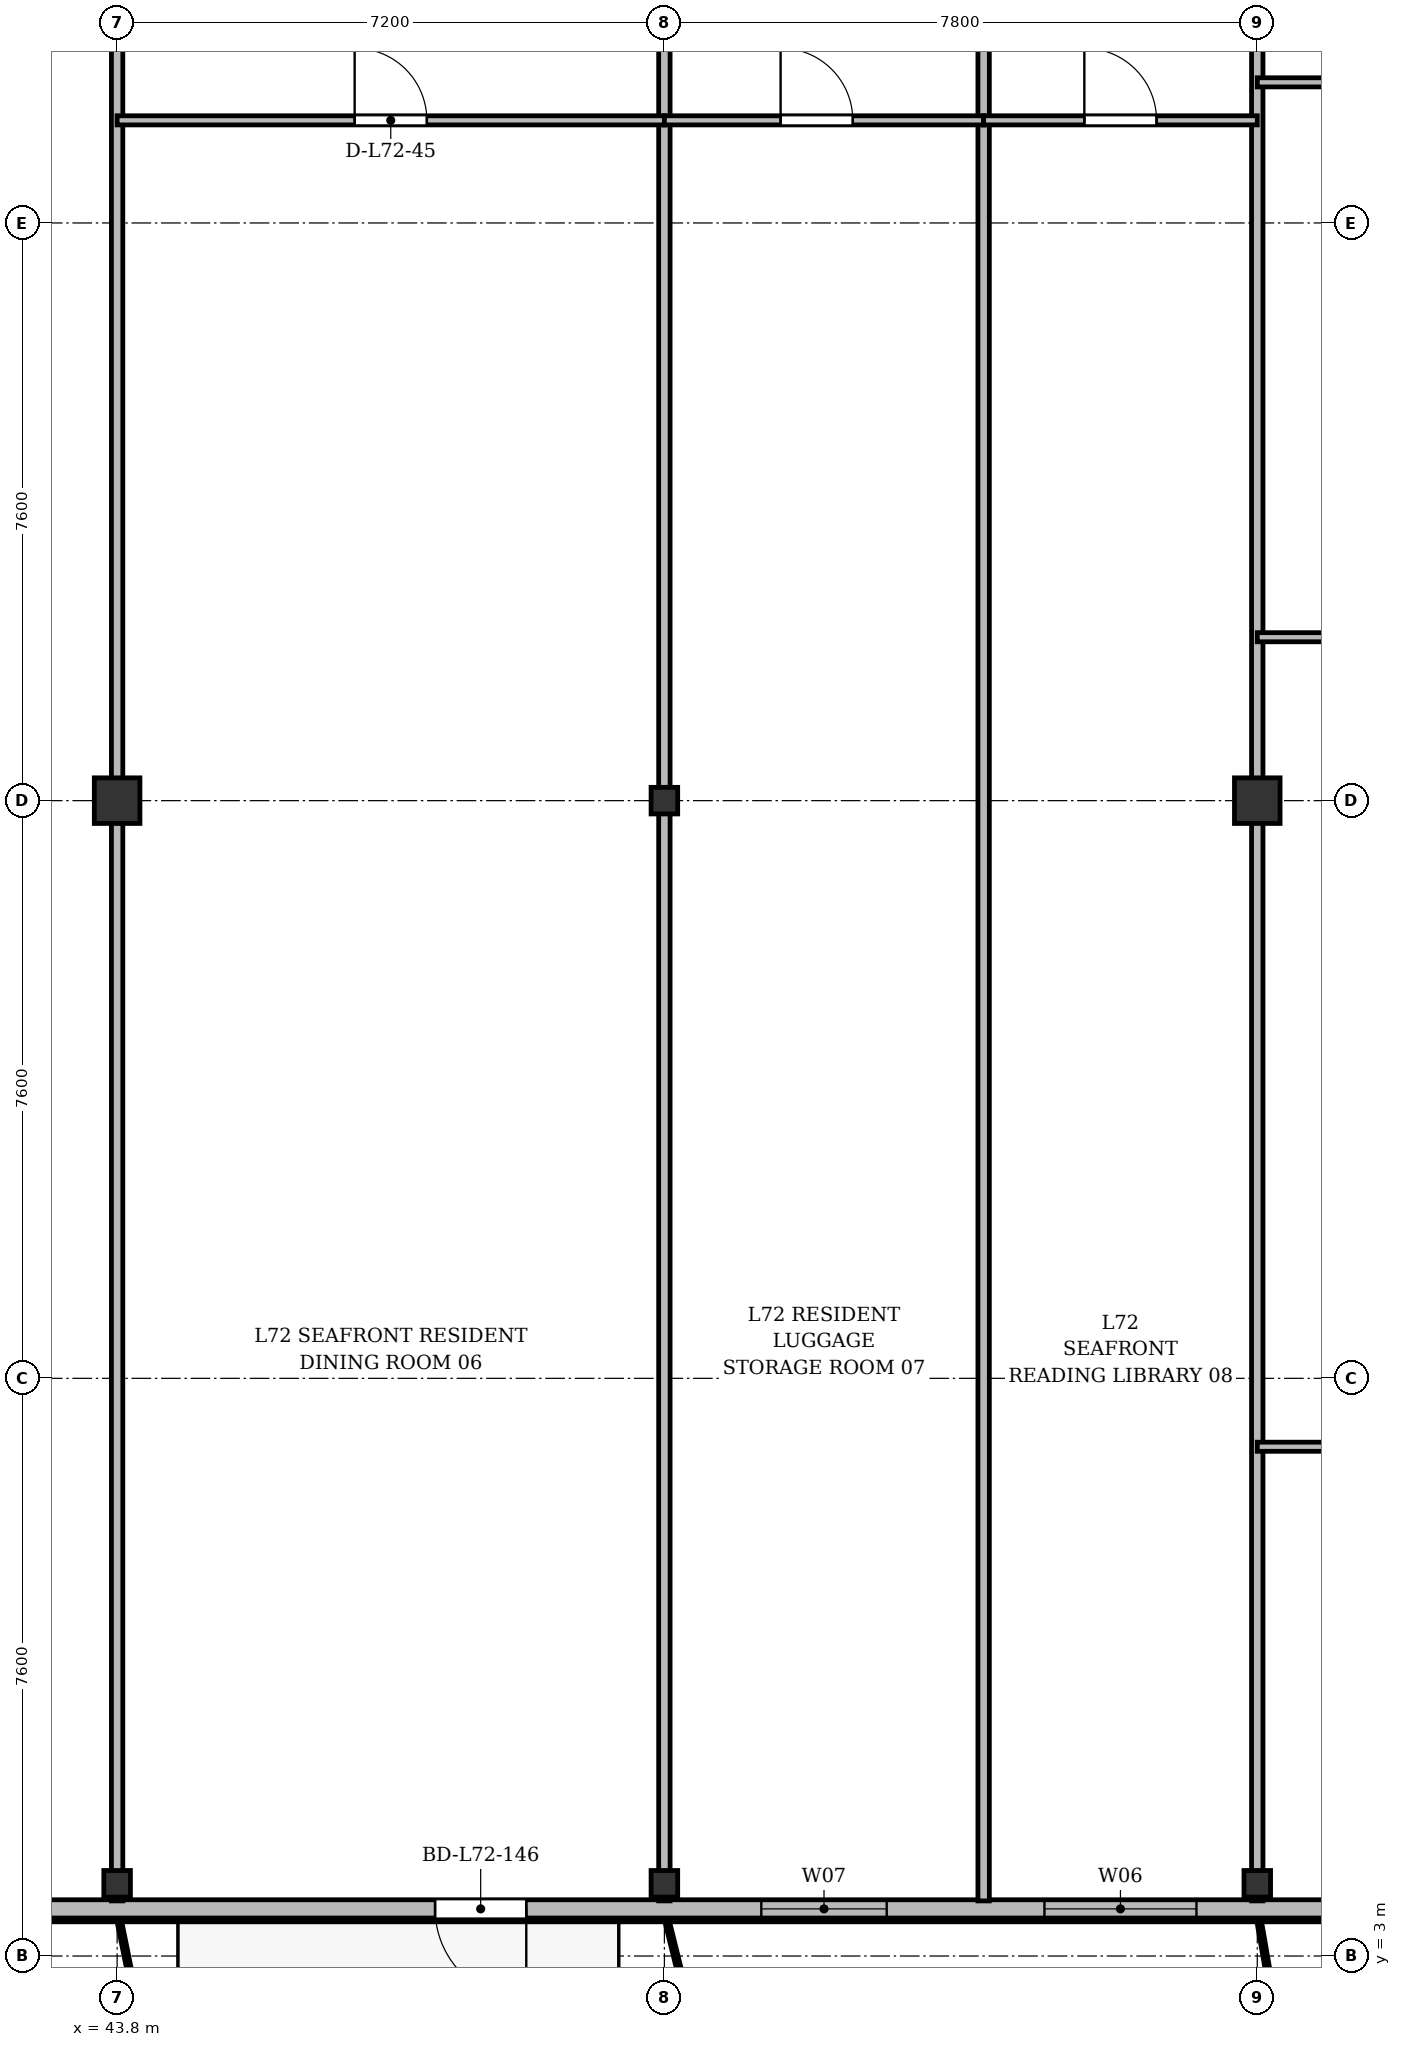
"""IFC4 building model, lengths in metres.
Left out: names, types, materials, properties, quantities, classifications, styles, units other than length and angle.
Written with IfcOpenShell. Run it as: python <this file> out.ifc"""

import sys

from ifc_helpers import new_model, si_unit, direction, frame, frame_2d, origin, origin_2d, place, context, subcontext, project, spatial, rectangle, i_section, extrude, source, transform, mapped, element, fill, save


model = new_model("IFC4")
c1 = context("Model", 3, precision=1e-05, world=origin(), true_north=direction((0.0, 1.0)))
c2 = subcontext(c1, "Body", "Model", "MODEL_VIEW")
j1 = project(units=[si_unit("LENGTHUNIT", "METRE"), si_unit("PLANEANGLEUNIT", "RADIAN")], contexts=[c1])
p1 = place(None, origin())
s1 = spatial("IfcSite", under=j1, at=p1, CompositionType="ELEMENT")
p2 = place(p1, origin())
s2 = spatial("IfcBuilding", under=s1, at=p2, CompositionType="ELEMENT")
p3 = place(p2, frame((0.0, 0.0, 277.5)))
s3 = spatial("IfcBuildingStorey", under=s2, at=p3, CompositionType="ELEMENT", Elevation=277.5)
m1 = source(origin(), c2, "Body", "SweptSolid", [
    extrude(i_section(OverallWidth=0.35, OverallDepth=0.35, WebThickness=0.018, FlangeThickness=0.028, at=origin_2d()), origin(), (0.0, 0.0, 1.0), 3.6),
])
p4 = place(p3, frame((43.8, 3.95, 0.0), z_axis=(0.0, 0.0, 1.0), x_axis=(1.0, 0.0, 0.0)))
e1 = element("IfcColumn", 1, at=p4, inside=s3, PredefinedType="COLUMN", context=c2, shape_type="MappedRepresentation", body=[
    mapped(m1, transform((0.0, 0.0, 0.0), x_axis=(1.0, 0.0, 0.0), y_axis=(0.0, 1.0, 0.0), z_axis=(0.0, 0.0, 1.0), scale=1.0)),
])
m2 = source(origin(), c2, "Body", "SweptSolid", [
    extrude(rectangle(XDim=0.6, YDim=0.6, at=origin_2d()), origin(), (0.0, 0.0, 1.0), 3.6),
])
p5 = place(p3, frame((43.8, 18.2, 0.0), z_axis=(0.0, 0.0, 1.0), x_axis=(1.0, 0.0, 0.0)))
e2 = element("IfcColumn", 2, at=p5, inside=s3, PredefinedType="COLUMN", context=c2, shape_type="MappedRepresentation", body=[
    mapped(m2, transform((0.0, 0.0, 0.0), x_axis=(1.0, 0.0, 0.0), y_axis=(0.0, 1.0, 0.0), z_axis=(0.0, 0.0, 1.0), scale=1.0)),
])
for number, where, z_axis, x_axis in (
    (3, (51.0, 3.95, 0.0), (0.0, 0.0, 1.0), (1.0, 0.0, 0.0)),
    (4, (51.0, 18.2, 0.0), (0.0, 0.0, 1.0), (1.0, 0.0, 0.0)),
    (5, (58.8, 3.95, 0.0), (0.0, 0.0, 1.0), (1.0, 0.0, 0.0)),
):
    element("IfcColumn", number, at=place(p3, frame(where, z_axis=z_axis, x_axis=x_axis)), inside=s3, PredefinedType="COLUMN", context=c2, shape_type="MappedRepresentation", body=[
        mapped(m1, transform((0.0, 0.0, 0.0), x_axis=(1.0, 0.0, 0.0), y_axis=(0.0, 1.0, 0.0), z_axis=(0.0, 0.0, 1.0), scale=1.0)),
    ])
p6 = place(p3, frame((58.8, 18.2, 0.0), z_axis=(0.0, 0.0, 1.0), x_axis=(1.0, 0.0, 0.0)))
e6 = element("IfcColumn", 6, at=p6, inside=s3, PredefinedType="COLUMN", context=c2, shape_type="MappedRepresentation", body=[
    mapped(m2, transform((0.0, 0.0, 0.0), x_axis=(1.0, 0.0, 0.0), y_axis=(0.0, 1.0, 0.0), z_axis=(0.0, 0.0, 1.0), scale=1.0)),
])
p7 = place(p3, frame((63.2, 3.62, 0.0), z_axis=(0.0, 0.0, 1.0), x_axis=(-1.0, 0.0, 0.0)))
e7 = element("IfcWall", 7, at=p7, inside=s3, PredefinedType="SOLIDWALL", context=c2, shape_type="SweptSolid", body=[
    extrude(rectangle(XDim=52.0, YDim=0.24, at=frame_2d((26.0, 0.0))), origin(), (0.0, 0.0, 1.0), 3.37),
])
p8 = place(p7, frame((1.495, 0.0, 0.9)))
e8 = element("IfcOpeningElement", 8, at=p8, cuts=e7, PredefinedType="OPENING", context=c2, shape_type="SweptSolid", body=[
    extrude(rectangle(XDim=1.5, YDim=1.75, at=frame_2d((0.75, 0.875))), frame((0.0, 0.13, 0.0), z_axis=(0.0, -1.0, 0.0), x_axis=(1.0, 0.0, 0.0)), (0.0, 0.0, 1.0), 0.26),
])
p9 = place(p7, frame((5.2, 0.0, 0.9)))
e9 = element("IfcOpeningElement", 9, at=p9, cuts=e7, PredefinedType="OPENING", context=c2, shape_type="SweptSolid", body=[
    extrude(rectangle(XDim=2.0, YDim=1.95, at=frame_2d((1.0, 0.975))), frame((0.0, 0.13, 0.0), z_axis=(0.0, -1.0, 0.0), x_axis=(1.0, 0.0, 0.0)), (0.0, 0.0, 1.0), 0.26),
])
p10 = place(p7, frame((9.275, 0.0, 0.9)))
e10 = element("IfcOpeningElement", 10, at=p10, cuts=e7, PredefinedType="OPENING", context=c2, shape_type="SweptSolid", body=[
    extrude(rectangle(XDim=1.65, YDim=1.85, at=frame_2d((0.825, 0.925))), frame((0.0, 0.13, 0.0), z_axis=(0.0, -1.0, 0.0), x_axis=(1.0, 0.0, 0.0)), (0.0, 0.0, 1.0), 0.26),
])
p11 = place(p7, frame((14.017, 0.0, 0.0)))
e11 = element("IfcOpeningElement", 11, at=p11, cuts=e7, PredefinedType="OPENING", context=c2, shape_type="SweptSolid", body=[
    extrude(rectangle(XDim=1.2, YDim=2.2, at=frame_2d((0.6, 1.1))), frame((0.0, 0.13, 0.0), z_axis=(0.0, -1.0, 0.0), x_axis=(1.0, 0.0, 0.0)), (0.0, 0.0, 1.0), 0.26),
])
p12 = place(p7, frame((24.9, 0.0, 0.9)))
e12 = element("IfcOpeningElement", 12, at=p12, cuts=e7, PredefinedType="OPENING", context=c2, shape_type="SweptSolid", body=[
    extrude(rectangle(XDim=2.2, YDim=1.8, at=frame_2d((1.1, 0.9))), frame((0.0, 0.13, 0.0), z_axis=(0.0, -1.0, 0.0), x_axis=(1.0, 0.0, 0.0)), (0.0, 0.0, 1.0), 0.26),
])
p13 = place(p7, frame((33.05, 0.0, 0.9)))
e13 = element("IfcOpeningElement", 13, at=p13, cuts=e7, PredefinedType="OPENING", context=c2, shape_type="SweptSolid", body=[
    extrude(rectangle(XDim=1.5, YDim=1.75, at=frame_2d((0.75, 0.875))), frame((0.0, 0.13, 0.0), z_axis=(0.0, -1.0, 0.0), x_axis=(1.0, 0.0, 0.0)), (0.0, 0.0, 1.0), 0.26),
])
p14 = place(p7, frame((35.45, 0.0, 0.9)))
e14 = element("IfcOpeningElement", 14, at=p14, cuts=e7, PredefinedType="OPENING", context=c2, shape_type="SweptSolid", body=[
    extrude(rectangle(XDim=1.5, YDim=1.75, at=frame_2d((0.75, 0.875))), frame((0.0, 0.13, 0.0), z_axis=(0.0, -1.0, 0.0), x_axis=(1.0, 0.0, 0.0)), (0.0, 0.0, 1.0), 0.26),
])
p15 = place(p7, frame((37.775, 0.0, 0.9)))
e15 = element("IfcOpeningElement", 15, at=p15, cuts=e7, PredefinedType="OPENING", context=c2, shape_type="SweptSolid", body=[
    extrude(rectangle(XDim=1.65, YDim=1.85, at=frame_2d((0.825, 0.925))), frame((0.0, 0.13, 0.0), z_axis=(0.0, -1.0, 0.0), x_axis=(1.0, 0.0, 0.0)), (0.0, 0.0, 1.0), 0.26),
])
p16 = place(p7, frame((41.452, 0.0, 0.0)))
e16 = element("IfcOpeningElement", 16, at=p16, cuts=e7, PredefinedType="OPENING", context=c2, shape_type="SweptSolid", body=[
    extrude(rectangle(XDim=1.2, YDim=2.2, at=frame_2d((0.6, 1.1))), frame((0.0, 0.13, 0.0), z_axis=(0.0, -1.0, 0.0), x_axis=(1.0, 0.0, 0.0)), (0.0, 0.0, 1.0), 0.26),
])
p17 = place(p7, frame((44.3, 0.0, 0.9)))
e17 = element("IfcOpeningElement", 17, at=p17, cuts=e7, PredefinedType="OPENING", context=c2, shape_type="SweptSolid", body=[
    extrude(rectangle(XDim=2.2, YDim=1.8, at=frame_2d((1.1, 0.9))), frame((0.0, 0.13, 0.0), z_axis=(0.0, -1.0, 0.0), x_axis=(1.0, 0.0, 0.0)), (0.0, 0.0, 1.0), 0.26),
])
p18 = place(p7, frame((49.005, 0.0, 0.9)))
e18 = element("IfcOpeningElement", 18, at=p18, cuts=e7, PredefinedType="OPENING", context=c2, shape_type="SweptSolid", body=[
    extrude(rectangle(XDim=1.5, YDim=1.75, at=frame_2d((0.75, 0.875))), frame((0.0, 0.13, 0.0), z_axis=(0.0, -1.0, 0.0), x_axis=(1.0, 0.0, 0.0)), (0.0, 0.0, 1.0), 0.26),
])
for number, where, z_axis, x_axis in (
    (19, (43.8, 3.725, 0.0), (0.0, 0.0, 1.0), (0.0, 1.0, 0.0)),
    (20, (51.0, 3.725, 0.0), (0.0, 0.0, 1.0), (0.0, 1.0, 0.0)),
):
    element("IfcWall", number, at=place(p3, frame(where, z_axis=z_axis, x_axis=x_axis)), inside=s3, PredefinedType="PARTITIONING", context=c2, shape_type="SweptSolid", body=[
        extrude(rectangle(XDim=27.275, YDim=0.15, at=frame_2d((13.637, 0.0))), origin(), (0.0, 0.0, 1.0), 2.87),
    ])
p19 = place(p3, frame((55.2, 3.725, 0.0), z_axis=(0.0, 0.0, 1.0), x_axis=(0.0, 1.0, 0.0)))
e21 = element("IfcWall", 21, at=p19, inside=s3, PredefinedType="PARTITIONING", context=c2, shape_type="SweptSolid", body=[
    extrude(rectangle(XDim=27.275, YDim=0.15, at=frame_2d((13.637, 0.0))), origin(), (0.0, 0.0, 1.0), 2.92),
])
p20 = place(p3, frame((58.8, 3.725, 0.0), z_axis=(0.0, 0.0, 1.0), x_axis=(0.0, 1.0, 0.0)))
e22 = element("IfcWall", 22, at=p20, inside=s3, PredefinedType="PARTITIONING", context=c2, shape_type="SweptSolid", body=[
    extrude(rectangle(XDim=27.275, YDim=0.15, at=frame_2d((13.637, 0.0))), origin(), (0.0, 0.0, 1.0), 2.87),
])
p21 = place(p3, frame((43.8, 27.15, 0.0), z_axis=(0.0, 0.0, 1.0), x_axis=(1.0, 0.0, 0.0)))
e23 = element("IfcWall", 23, at=p21, inside=s3, PredefinedType="PARTITIONING", context=c2, shape_type="SweptSolid", body=[
    extrude(rectangle(XDim=7.2, YDim=0.12, at=frame_2d((3.6, 0.0))), origin(), (0.0, 0.0, 1.0), 2.87),
])
p22 = place(p21, frame((3.125, 0.0, 0.0)))
e24 = element("IfcOpeningElement", 24, at=p22, cuts=e23, PredefinedType="OPENING", context=c2, shape_type="SweptSolid", body=[
    extrude(rectangle(XDim=0.95, YDim=2.15, at=frame_2d((0.475, 1.075))), frame((0.0, 0.07, 0.0), z_axis=(0.0, -1.0, 0.0), x_axis=(1.0, 0.0, 0.0)), (0.0, 0.0, 1.0), 0.14),
])
p23 = place(p3, frame((51.0, 27.15, 0.0), z_axis=(0.0, 0.0, 1.0), x_axis=(1.0, 0.0, 0.0)))
e25 = element("IfcWall", 25, at=p23, inside=s3, PredefinedType="PARTITIONING", context=c2, shape_type="SweptSolid", body=[
    extrude(rectangle(XDim=4.2, YDim=0.12, at=frame_2d((2.1, 0.0))), origin(), (0.0, 0.0, 1.0), 2.87),
])
p24 = place(p23, frame((1.529, 0.0, 0.0)))
e26 = element("IfcOpeningElement", 26, at=p24, cuts=e25, PredefinedType="OPENING", context=c2, shape_type="SweptSolid", body=[
    extrude(rectangle(XDim=0.95, YDim=2.15, at=frame_2d((0.475, 1.075))), frame((0.0, 0.07, 0.0), z_axis=(0.0, -1.0, 0.0), x_axis=(1.0, 0.0, 0.0)), (0.0, 0.0, 1.0), 0.14),
])
p25 = place(p3, frame((55.2, 27.15, 0.0), z_axis=(0.0, 0.0, 1.0), x_axis=(1.0, 0.0, 0.0)))
e27 = element("IfcWall", 27, at=p25, inside=s3, PredefinedType="PARTITIONING", context=c2, shape_type="SweptSolid", body=[
    extrude(rectangle(XDim=3.6, YDim=0.12, at=frame_2d((1.8, 0.0))), origin(), (0.0, 0.0, 1.0), 2.87),
])
p26 = place(p25, frame((1.325, 0.0, 0.0)))
e28 = element("IfcOpeningElement", 28, at=p26, cuts=e27, PredefinedType="OPENING", context=c2, shape_type="SweptSolid", body=[
    extrude(rectangle(XDim=0.95, YDim=2.15, at=frame_2d((0.475, 1.075))), frame((0.0, 0.07, 0.0), z_axis=(0.0, -1.0, 0.0), x_axis=(1.0, 0.0, 0.0)), (0.0, 0.0, 1.0), 0.14),
])
p27 = place(p3, frame((58.8, 20.35, 0.0), z_axis=(0.0, 0.0, 1.0), x_axis=(1.0, 0.0, 0.0)))
e29 = element("IfcWall", 29, at=p27, inside=s3, PredefinedType="PARTITIONING", context=c2, shape_type="SweptSolid", body=[
    extrude(rectangle(XDim=7.16, YDim=0.12, at=frame_2d((3.58, 0.0))), origin(), (0.0, 0.0, 1.0), 2.87),
])
p28 = place(p27, frame((3.105, 0.0, 0.0)))
e30 = element("IfcOpeningElement", 30, at=p28, cuts=e29, PredefinedType="OPENING", context=c2, shape_type="SweptSolid", body=[
    extrude(rectangle(XDim=0.95, YDim=2.15, at=frame_2d((0.475, 1.075))), frame((0.0, 0.07, 0.0), z_axis=(0.0, -1.0, 0.0), x_axis=(1.0, 0.0, 0.0)), (0.0, 0.0, 1.0), 0.14),
])
p29 = place(p3, frame((58.8, 27.65, 0.0), z_axis=(0.0, 0.0, 1.0), x_axis=(1.0, 0.0, 0.0)))
e31 = element("IfcWall", 31, at=p29, inside=s3, PredefinedType="PARTITIONING", context=c2, shape_type="SweptSolid", body=[
    extrude(rectangle(XDim=2.4, YDim=0.12, at=frame_2d((1.2, 0.0))), origin(), (0.0, 0.0, 1.0), 2.87),
])
p30 = place(p3, frame((58.8, 9.7, 0.0), z_axis=(0.0, 0.0, 1.0), x_axis=(1.0, 0.0, 0.0)))
e32 = element("IfcWall", 32, at=p30, inside=s3, PredefinedType="PARTITIONING", context=c2, shape_type="SweptSolid", body=[
    extrude(rectangle(XDim=7.16, YDim=0.12, at=frame_2d((3.58, 0.0))), origin(), (0.0, 0.0, 1.0), 2.87),
])
p31 = place(p30, frame((3.105, 0.0, 0.0)))
e33 = element("IfcOpeningElement", 33, at=p31, cuts=e32, PredefinedType="OPENING", context=c2, shape_type="SweptSolid", body=[
    extrude(rectangle(XDim=0.95, YDim=2.15, at=frame_2d((0.475, 1.075))), frame((0.0, 0.07, 0.0), z_axis=(0.0, -1.0, 0.0), x_axis=(1.0, 0.0, 0.0)), (0.0, 0.0, 1.0), 0.14),
])
m3 = source(origin(), c2, "Body", "SweptSolid", [
    extrude(rectangle(XDim=2.0, YDim=1.95, at=frame_2d((1.0, 0.975))), frame((0.0, 0.03, 0.0), z_axis=(0.0, -1.0, 0.0), x_axis=(1.0, 0.0, 0.0)), (0.0, 0.0, 1.0), 0.06),
])
p32 = place(p9, origin())
e34 = element("IfcWindow", 34, at=p32, inside=s3, PartitioningType="SINGLE_PANEL", PredefinedType="WINDOW", context=c2, shape_type="MappedRepresentation", body=[
    mapped(m3, transform((0.0, 0.0, 0.0), x_axis=(1.0, 0.0, 0.0), y_axis=(0.0, 1.0, 0.0), z_axis=(0.0, 0.0, 1.0), scale=1.0)),
])
fill(e9, e34)
m4 = source(origin(), c2, "Body", "SweptSolid", [
    extrude(rectangle(XDim=1.65, YDim=1.85, at=frame_2d((0.825, 0.925))), frame((0.0, 0.03, 0.0), z_axis=(0.0, -1.0, 0.0), x_axis=(1.0, 0.0, 0.0)), (0.0, 0.0, 1.0), 0.06),
])
p33 = place(p10, origin())
e35 = element("IfcWindow", 35, at=p33, inside=s3, PartitioningType="SINGLE_PANEL", PredefinedType="WINDOW", context=c2, shape_type="MappedRepresentation", body=[
    mapped(m4, transform((0.0, 0.0, 0.0), x_axis=(1.0, 0.0, 0.0), y_axis=(0.0, 1.0, 0.0), z_axis=(0.0, 0.0, 1.0), scale=1.0)),
])
fill(e10, e35)
m5 = source(origin(), c2, "Body", "SweptSolid", [
    extrude(rectangle(XDim=1.2, YDim=2.2, at=frame_2d((0.6, 1.1))), frame((0.0, 0.025, 0.0), z_axis=(0.0, -1.0, 0.0), x_axis=(1.0, 0.0, 0.0)), (0.0, 0.0, 1.0), 0.05),
])
p34 = place(p11, origin())
e36 = element("IfcDoor", 36, at=p34, inside=s3, OperationType="SINGLE_SWING_LEFT", PredefinedType="DOOR", context=c2, shape_type="MappedRepresentation", body=[
    mapped(m5, transform((0.0, 0.0, 0.0), x_axis=(1.0, 0.0, 0.0), y_axis=(0.0, 1.0, 0.0), z_axis=(0.0, 0.0, 1.0), scale=1.0)),
])
fill(e11, e36)
m6 = source(origin(), c2, "Body", "SweptSolid", [
    extrude(rectangle(XDim=0.95, YDim=2.15, at=frame_2d((0.475, 1.075))), frame((0.0, 0.025, 0.0), z_axis=(0.0, -1.0, 0.0), x_axis=(1.0, 0.0, 0.0)), (0.0, 0.0, 1.0), 0.05),
])
p35 = place(p22, origin())
e37 = element("IfcDoor", 37, at=p35, inside=s3, OperationType="SINGLE_SWING_LEFT", PredefinedType="DOOR", context=c2, shape_type="MappedRepresentation", body=[
    mapped(m6, transform((0.0, 0.0, 0.0), x_axis=(1.0, 0.0, 0.0), y_axis=(0.0, 1.0, 0.0), z_axis=(0.0, 0.0, 1.0), scale=1.0)),
])
fill(e24, e37)
p36 = place(p24, origin())
e38 = element("IfcDoor", 38, at=p36, inside=s3, OperationType="SINGLE_SWING_LEFT", PredefinedType="DOOR", context=c2, shape_type="MappedRepresentation", body=[
    mapped(m6, transform((0.0, 0.0, 0.0), x_axis=(1.0, 0.0, 0.0), y_axis=(0.0, 1.0, 0.0), z_axis=(0.0, 0.0, 1.0), scale=1.0)),
])
fill(e26, e38)
p37 = place(p26, origin())
e39 = element("IfcDoor", 39, at=p37, inside=s3, OperationType="SINGLE_SWING_LEFT", PredefinedType="DOOR", context=c2, shape_type="MappedRepresentation", body=[
    mapped(m6, transform((0.0, 0.0, 0.0), x_axis=(1.0, 0.0, 0.0), y_axis=(0.0, 1.0, 0.0), z_axis=(0.0, 0.0, 1.0), scale=1.0)),
])
fill(e28, e39)
save(model, sys.argv[1])
